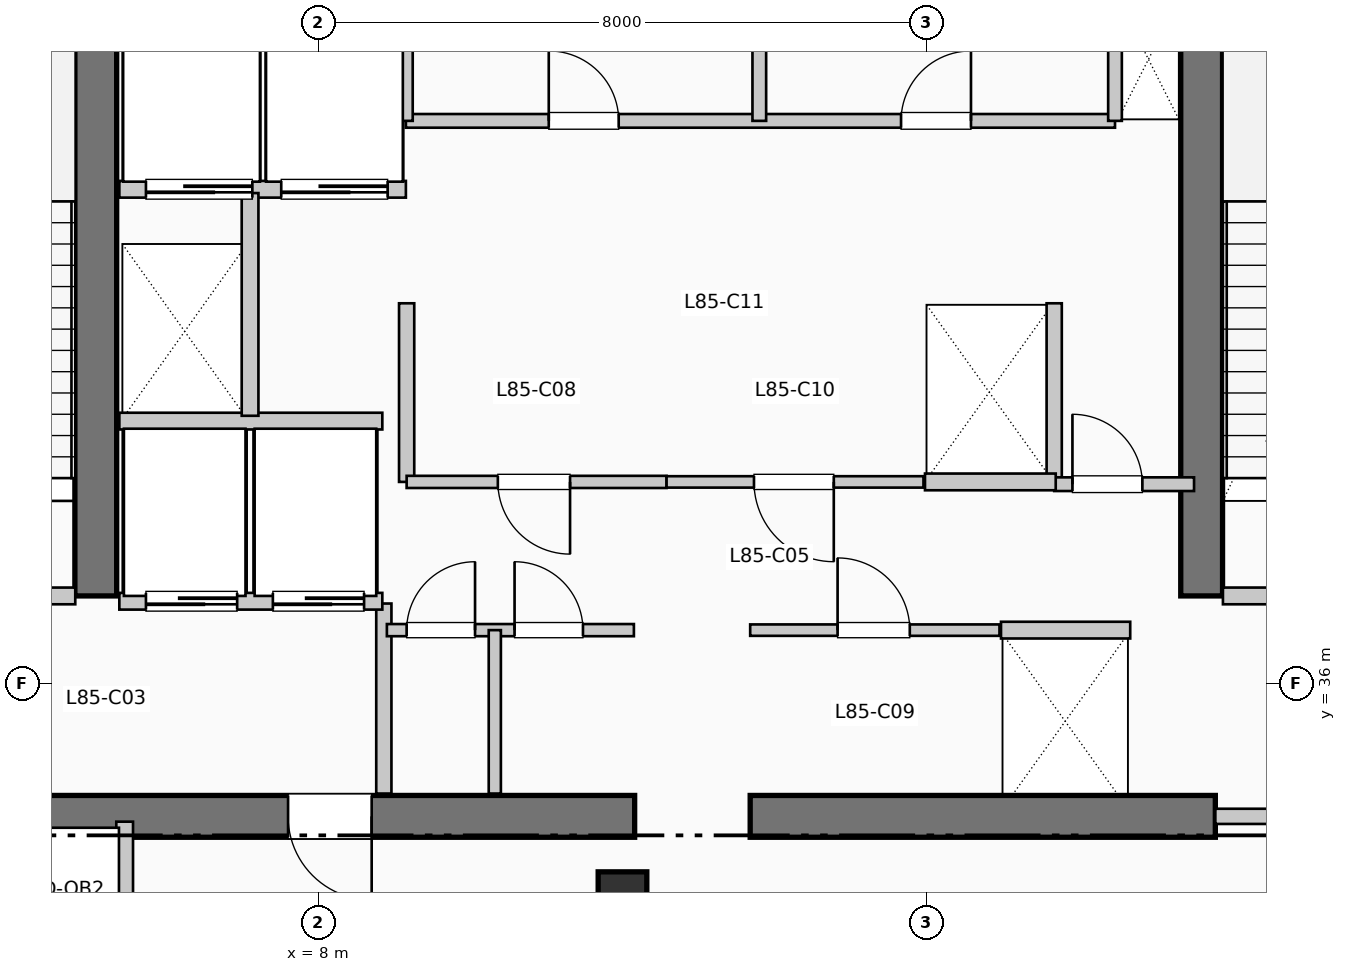
"""IFC4 building model, lengths in metres.
Left out: names, types, materials, properties, quantities, classifications, styles, units other than length and angle.
Written with IfcOpenShell. Run it as: python <this file> out.ifc"""

import sys

from ifc_helpers import new_model, si_unit, direction, frame, frame_2d, origin, origin_2d, place, context, subcontext, project, spatial, rectangle, extrude, element, fill, save


model = new_model("IFC4")
c1 = context("Model", 3, precision=1e-05, world=origin(), true_north=direction((0.0, 1.0)))
c2 = subcontext(c1, "Body", "Model", "MODEL_VIEW")
j1 = project(units=[si_unit("LENGTHUNIT", "METRE"), si_unit("PLANEANGLEUNIT", "RADIAN")], contexts=[c1])
p1 = place(None, origin())
s1 = spatial("IfcSite", under=j1, at=p1, CompositionType="ELEMENT")
p2 = place(p1, origin())
s2 = spatial("IfcBuilding", under=s1, at=p2, CompositionType="ELEMENT")
p3 = place(p2, frame((0.0, 0.0, 347.49)))
s3 = spatial("IfcBuildingStorey", under=s2, at=p3, CompositionType="ELEMENT", Elevation=347.49)
p4 = place(p3, frame((1.45, 34.25, 0.0), z_axis=(0.0, 0.0, 1.0), x_axis=(1.0, 0.0, 0.0)))
e1 = element("IfcWall", 1, at=p4, inside=s3, PredefinedType="SHEAR", context=c2, shape_type="SweptSolid", body=[
    extrude(rectangle(XDim=10.71, YDim=0.55, at=frame_2d((5.355, 0.0))), origin(), (0.0, 0.0, 1.0), 4.62),
])
p5 = place(p4, frame((7.25, 0.0, 0.0), z_axis=(0.0, 0.0, 1.0), x_axis=(-1.0, 0.0, 0.0)))
e2 = element("IfcOpeningElement", 2, at=p5, cuts=e1, PredefinedType="OPENING", context=c2, shape_type="SweptSolid", body=[
    extrude(rectangle(XDim=1.1, YDim=2.15, at=frame_2d((0.55, 1.075))), frame((0.0, 0.285, 0.0), z_axis=(0.0, -1.0, 0.0), x_axis=(1.0, 0.0, 0.0)), (0.0, 0.0, 1.0), 0.57),
])
p6 = place(p3, frame((13.68, 34.25, 0.0), z_axis=(0.0, 0.0, 1.0), x_axis=(1.0, 0.0, 0.0)))
e3 = element("IfcWall", 3, at=p6, inside=s3, PredefinedType="SHEAR", context=c2, shape_type="SweptSolid", body=[
    extrude(rectangle(XDim=6.12, YDim=0.55, at=frame_2d((3.06, 0.0))), origin(), (0.0, 0.0, 1.0), 4.62),
])
for number, where, z_axis, x_axis in (
    (4, (5.07, 37.15, 0.0), (0.0, 0.0, 1.0), (0.0, 1.0, 0.0)),
    (5, (19.62, 37.15, 0.0), (0.0, 0.0, 1.0), (0.0, 1.0, 0.0)),
):
    element("IfcWall", number, at=place(p3, frame(where, z_axis=z_axis, x_axis=x_axis)), inside=s3, PredefinedType="SHEAR", context=c2, shape_type="SweptSolid", body=[
        extrude(rectangle(XDim=7.89, YDim=0.55, at=frame_2d((3.945, 0.0))), origin(), (0.0, 0.0, 1.0), 4.62),
    ])
p7 = place(p3, frame((12.0, 33.2, 0.0), z_axis=(0.0, 0.0, 1.0), x_axis=(1.0, 0.0, 0.0)))
e6 = element("IfcColumn", 6, at=p7, inside=s3, PredefinedType="COLUMN", context=c2, shape_type="SweptSolid", body=[
    extrude(rectangle(XDim=0.64, YDim=0.64, at=origin_2d()), origin(), (0.0, 0.0, 1.0), 4.62),
])
p8 = place(p3, frame((1.65, 37.15, 0.0), z_axis=(0.0, 0.0, 1.0), x_axis=(1.0, 0.0, 0.0)))
e7 = element("IfcWall", 7, at=p8, inside=s3, PredefinedType="PARTITIONING", context=c2, shape_type="SweptSolid", body=[
    extrude(rectangle(XDim=3.15, YDim=0.22, at=frame_2d((1.575, 0.0))), origin(), (0.0, 0.0, 1.0), 4.37),
])
p9 = place(p8, frame((2.05, 0.0, 0.0), z_axis=(0.0, 0.0, 1.0), x_axis=(-1.0, 0.0, 0.0)))
e8 = element("IfcOpeningElement", 8, at=p9, cuts=e7, PredefinedType="OPENING", context=c2, shape_type="SweptSolid", body=[
    extrude(rectangle(XDim=1.05, YDim=2.15, at=frame_2d((0.525, 1.075))), frame((0.0, 0.12, 0.0), z_axis=(0.0, -1.0, 0.0), x_axis=(1.0, 0.0, 0.0)), (0.0, 0.0, 1.0), 0.24),
])
p10 = place(p3, frame((8.86, 34.55, 0.0), z_axis=(0.0, 0.0, 1.0), x_axis=(0.0, 1.0, 0.0)))
e9 = element("IfcWall", 9, at=p10, inside=s3, PredefinedType="PARTITIONING", context=c2, shape_type="SweptSolid", body=[
    extrude(rectangle(XDim=2.5, YDim=0.2, at=frame_2d((1.25, 0.0))), origin(), (0.0, 0.0, 1.0), 4.37),
])
p11 = place(p3, frame((19.9, 37.15, 0.0), z_axis=(0.0, 0.0, 1.0), x_axis=(1.0, 0.0, 0.0)))
e10 = element("IfcWall", 10, at=p11, inside=s3, PredefinedType="PARTITIONING", context=c2, shape_type="SweptSolid", body=[
    extrude(rectangle(XDim=3.15, YDim=0.22, at=frame_2d((1.575, 0.0))), origin(), (0.0, 0.0, 1.0), 4.37),
])
p12 = place(p11, frame((2.05, 0.0, 0.0), z_axis=(0.0, 0.0, 1.0), x_axis=(-1.0, 0.0, 0.0)))
e11 = element("IfcOpeningElement", 11, at=p12, cuts=e10, PredefinedType="OPENING", context=c2, shape_type="SweptSolid", body=[
    extrude(rectangle(XDim=1.05, YDim=2.15, at=frame_2d((0.525, 1.075))), frame((0.0, 0.12, 0.0), z_axis=(0.0, -1.0, 0.0), x_axis=(1.0, 0.0, 0.0)), (0.0, 0.0, 1.0), 0.24),
])
p13 = place(p3, frame((19.8, 34.25, 0.0), z_axis=(0.0, 0.0, 1.0), x_axis=(1.0, 0.0, 0.0)))
e12 = element("IfcWall", 12, at=p13, inside=s3, PredefinedType="PARTITIONING", context=c2, shape_type="SweptSolid", body=[
    extrude(rectangle(XDim=3.25, YDim=0.2, at=frame_2d((1.625, 0.0))), origin(), (0.0, 0.0, 1.0), 4.37),
])
p14 = place(p13, frame((2.15, 0.0, 0.0), z_axis=(0.0, 0.0, 1.0), x_axis=(-1.0, 0.0, 0.0)))
e13 = element("IfcOpeningElement", 13, at=p14, cuts=e12, PredefinedType="OPENING", context=c2, shape_type="SweptSolid", body=[
    extrude(rectangle(XDim=1.1, YDim=2.15, at=frame_2d((0.55, 1.075))), frame((0.0, 0.11, 0.0), z_axis=(0.0, -1.0, 0.0), x_axis=(1.0, 0.0, 0.0)), (0.0, 0.0, 1.0), 0.22),
])
p15 = place(p3, frame((5.38, 37.08, 0.0), z_axis=(0.0, 0.0, 1.0), x_axis=(1.0, 0.0, 0.0)))
e14 = element("IfcWall", 14, at=p15, inside=s3, PredefinedType="PARTITIONING", context=c2, shape_type="SweptSolid", body=[
    extrude(rectangle(XDim=3.46, YDim=0.22, at=frame_2d((1.73, 0.0))), origin(), (0.0, 0.0, 1.0), 4.37),
])
p16 = place(p15, frame((1.55, 0.0, 0.0), z_axis=(0.0, 0.0, 1.0), x_axis=(-1.0, 0.0, 0.0)))
e15 = element("IfcOpeningElement", 15, at=p16, cuts=e14, PredefinedType="OPENING", context=c2, shape_type="SweptSolid", body=[
    extrude(rectangle(XDim=1.2, YDim=2.2, at=frame_2d((0.6, 1.1))), frame((0.0, 0.12, 0.0), z_axis=(0.0, -1.0, 0.0), x_axis=(1.0, 0.0, 0.0)), (0.0, 0.0, 1.0), 0.24),
])
p17 = place(p15, frame((3.22, 0.0, 0.0), z_axis=(0.0, 0.0, 1.0), x_axis=(-1.0, 0.0, 0.0)))
e16 = element("IfcOpeningElement", 16, at=p17, cuts=e14, PredefinedType="OPENING", context=c2, shape_type="SweptSolid", body=[
    extrude(rectangle(XDim=1.2, YDim=2.2, at=frame_2d((0.6, 1.1))), frame((0.0, 0.12, 0.0), z_axis=(0.0, -1.0, 0.0), x_axis=(1.0, 0.0, 0.0)), (0.0, 0.0, 1.0), 0.24),
])
p18 = place(p3, frame((5.38, 39.45, 0.0), z_axis=(0.0, 0.0, 1.0), x_axis=(1.0, 0.0, 0.0)))
e17 = element("IfcWall", 17, at=p18, inside=s3, PredefinedType="PARTITIONING", context=c2, shape_type="SweptSolid", body=[
    extrude(rectangle(XDim=3.46, YDim=0.22, at=frame_2d((1.73, 0.0))), origin(), (0.0, 0.0, 1.0), 4.37),
])
p19 = place(p3, frame((5.38, 42.5, 0.0), z_axis=(0.0, 0.0, 1.0), x_axis=(1.0, 0.0, 0.0)))
e18 = element("IfcWall", 18, at=p19, inside=s3, PredefinedType="PARTITIONING", context=c2, shape_type="SweptSolid", body=[
    extrude(rectangle(XDim=3.77, YDim=0.22, at=frame_2d((1.885, 0.0))), origin(), (0.0, 0.0, 1.0), 4.37),
])
p20 = place(p19, frame((1.75, 0.0, 0.0), z_axis=(0.0, 0.0, 1.0), x_axis=(-1.0, 0.0, 0.0)))
e19 = element("IfcOpeningElement", 19, at=p20, cuts=e18, PredefinedType="OPENING", context=c2, shape_type="SweptSolid", body=[
    extrude(rectangle(XDim=1.4, YDim=2.2, at=frame_2d((0.7, 1.1))), frame((0.0, 0.12, 0.0), z_axis=(0.0, -1.0, 0.0), x_axis=(1.0, 0.0, 0.0)), (0.0, 0.0, 1.0), 0.24),
])
p21 = place(p19, frame((3.53, 0.0, 0.0), z_axis=(0.0, 0.0, 1.0), x_axis=(-1.0, 0.0, 0.0)))
e20 = element("IfcOpeningElement", 20, at=p21, cuts=e18, PredefinedType="OPENING", context=c2, shape_type="SweptSolid", body=[
    extrude(rectangle(XDim=1.4, YDim=2.2, at=frame_2d((0.7, 1.1))), frame((0.0, 0.12, 0.0), z_axis=(0.0, -1.0, 0.0), x_axis=(1.0, 0.0, 0.0)), (0.0, 0.0, 1.0), 0.24),
])
p22 = place(p3, frame((7.1, 39.52, 0.0), z_axis=(0.0, 0.0, 1.0), x_axis=(0.0, 1.0, 0.0)))
e21 = element("IfcWall", 21, at=p22, inside=s3, PredefinedType="PARTITIONING", context=c2, shape_type="SweptSolid", body=[
    extrude(rectangle(XDim=2.93, YDim=0.22, at=frame_2d((1.465, 0.0))), origin(), (0.0, 0.0, 1.0), 4.37),
])
p23 = place(p3, frame((5.45, 31.8, 0.0), z_axis=(0.0, 0.0, 1.0), x_axis=(0.0, 1.0, 0.0)))
e22 = element("IfcWall", 22, at=p23, inside=s3, PredefinedType="PARTITIONING", context=c2, shape_type="SweptSolid", body=[
    extrude(rectangle(XDim=2.38, YDim=0.22, at=frame_2d((1.19, 0.0))), origin(), (0.0, 0.0, 1.0), 4.37),
])
for number, where, z_axis, x_axis in (
    (23, (9.16, 38.65, 0.0), (0.0, 0.0, 1.0), (0.0, 1.0, 0.0)),
    (24, (17.68, 38.65, 0.0), (0.0, 0.0, 1.0), (0.0, 1.0, 0.0)),
):
    element("IfcWall", number, at=place(p3, frame(where, z_axis=z_axis, x_axis=x_axis)), inside=s3, PredefinedType="PARTITIONING", context=c2, shape_type="SweptSolid", body=[
        extrude(rectangle(XDim=2.35, YDim=0.2, at=frame_2d((1.175, 0.0))), origin(), (0.0, 0.0, 1.0), 4.37),
    ])
p24 = place(p3, frame((17.68, 38.62, 0.0), z_axis=(0.0, 0.0, 1.0), x_axis=(1.0, 0.0, 0.0)))
e25 = element("IfcWall", 25, at=p24, inside=s3, PredefinedType="PARTITIONING", context=c2, shape_type="SweptSolid", body=[
    extrude(rectangle(XDim=1.84, YDim=0.18, at=frame_2d((0.92, 0.0))), origin(), (0.0, 0.0, 1.0), 4.37),
])
p25 = place(p24, frame((0.24, 0.0, 0.0)))
e26 = element("IfcOpeningElement", 26, at=p25, cuts=e25, PredefinedType="OPENING", context=c2, shape_type="SweptSolid", body=[
    extrude(rectangle(XDim=0.92, YDim=2.1, at=frame_2d((0.46, 1.05))), frame((0.0, 0.1, 0.0), z_axis=(0.0, -1.0, 0.0), x_axis=(1.0, 0.0, 0.0)), (0.0, 0.0, 1.0), 0.2),
])
p26 = place(p3, frame((8.9, 36.7, 0.0), z_axis=(0.0, 0.0, 1.0), x_axis=(1.0, 0.0, 0.0)))
e27 = element("IfcWall", 27, at=p26, inside=s3, PredefinedType="PARTITIONING", context=c2, shape_type="SweptSolid", body=[
    extrude(rectangle(XDim=3.25, YDim=0.16, at=frame_2d((1.625, 0.0))), origin(), (0.0, 0.0, 1.0), 4.37),
])
p27 = place(p26, frame((0.26, 0.0, 0.0)))
e28 = element("IfcOpeningElement", 28, at=p27, cuts=e27, PredefinedType="OPENING", context=c2, shape_type="SweptSolid", body=[
    extrude(rectangle(XDim=0.9, YDim=2.15, at=frame_2d((0.45, 1.075))), frame((0.0, 0.09, 0.0), z_axis=(0.0, -1.0, 0.0), x_axis=(1.0, 0.0, 0.0)), (0.0, 0.0, 1.0), 0.18),
])
p28 = place(p26, frame((1.68, 0.0, 0.0)))
e29 = element("IfcOpeningElement", 29, at=p28, cuts=e27, PredefinedType="OPENING", context=c2, shape_type="SweptSolid", body=[
    extrude(rectangle(XDim=0.9, YDim=2.15, at=frame_2d((0.45, 1.075))), frame((0.0, 0.09, 0.0), z_axis=(0.0, -1.0, 0.0), x_axis=(1.0, 0.0, 0.0)), (0.0, 0.0, 1.0), 0.18),
])
p29 = place(p3, frame((10.32, 34.55, 0.0), z_axis=(0.0, 0.0, 1.0), x_axis=(0.0, 1.0, 0.0)))
e30 = element("IfcWall", 30, at=p29, inside=s3, PredefinedType="PARTITIONING", context=c2, shape_type="SweptSolid", body=[
    extrude(rectangle(XDim=2.15, YDim=0.16, at=frame_2d((1.075, 0.0))), origin(), (0.0, 0.0, 1.0), 4.37),
])
p30 = place(p3, frame((9.16, 38.65, 0.0), z_axis=(0.0, 0.0, 1.0), x_axis=(1.0, 0.0, 0.0)))
e31 = element("IfcWall", 31, at=p30, inside=s3, PredefinedType="PARTITIONING", context=c2, shape_type="SweptSolid", body=[
    extrude(rectangle(XDim=3.42, YDim=0.16, at=frame_2d((1.71, 0.0))), origin(), (0.0, 0.0, 1.0), 4.37),
])
p31 = place(p30, frame((2.15, 0.0, 0.0), z_axis=(0.0, 0.0, 1.0), x_axis=(-1.0, 0.0, 0.0)))
e32 = element("IfcOpeningElement", 32, at=p31, cuts=e31, PredefinedType="OPENING", context=c2, shape_type="SweptSolid", body=[
    extrude(rectangle(XDim=0.95, YDim=2.15, at=frame_2d((0.475, 1.075))), frame((0.0, 0.09, 0.0), z_axis=(0.0, -1.0, 0.0), x_axis=(1.0, 0.0, 0.0)), (0.0, 0.0, 1.0), 0.18),
])
p32 = place(p3, frame((13.68, 36.7, 0.0), z_axis=(0.0, 0.0, 1.0), x_axis=(1.0, 0.0, 0.0)))
e33 = element("IfcWall", 33, at=p32, inside=s3, PredefinedType="PARTITIONING", context=c2, shape_type="SweptSolid", body=[
    extrude(rectangle(XDim=3.28, YDim=0.15, at=frame_2d((1.64, 0.0))), origin(), (0.0, 0.0, 1.0), 4.37),
])
p33 = place(p32, frame((1.15, 0.0, 0.0)))
e34 = element("IfcOpeningElement", 34, at=p33, cuts=e33, PredefinedType="OPENING", context=c2, shape_type="SweptSolid", body=[
    extrude(rectangle(XDim=0.95, YDim=2.15, at=frame_2d((0.475, 1.075))), frame((0.0, 0.085, 0.0), z_axis=(0.0, -1.0, 0.0), x_axis=(1.0, 0.0, 0.0)), (0.0, 0.0, 1.0), 0.17),
])
p34 = place(p3, frame((12.58, 38.65, 0.0), z_axis=(0.0, 0.0, 1.0), x_axis=(1.0, 0.0, 0.0)))
e35 = element("IfcWall", 35, at=p34, inside=s3, PredefinedType="PARTITIONING", context=c2, shape_type="SweptSolid", body=[
    extrude(rectangle(XDim=3.38, YDim=0.15, at=frame_2d((1.69, 0.0))), origin(), (0.0, 0.0, 1.0), 4.37),
])
p35 = place(p34, frame((2.2, 0.0, 0.0), z_axis=(0.0, 0.0, 1.0), x_axis=(-1.0, 0.0, 0.0)))
e36 = element("IfcOpeningElement", 36, at=p35, cuts=e35, PredefinedType="OPENING", context=c2, shape_type="SweptSolid", body=[
    extrude(rectangle(XDim=1.05, YDim=2.15, at=frame_2d((0.525, 1.075))), frame((0.0, 0.085, 0.0), z_axis=(0.0, -1.0, 0.0), x_axis=(1.0, 0.0, 0.0)), (0.0, 0.0, 1.0), 0.17),
])
p36 = place(p3, frame((16.98, 36.7, 0.0), z_axis=(0.0, 0.0, 1.0), x_axis=(1.0, 0.0, 0.0)))
e37 = element("IfcWall", 37, at=p36, inside=s3, PredefinedType="PARTITIONING", context=c2, shape_type="SweptSolid", body=[
    extrude(rectangle(XDim=1.7, YDim=0.22, at=frame_2d((0.85, 0.0))), origin(), (0.0, 0.0, 1.0), 4.37),
])
p37 = place(p3, frame((15.98, 38.65, 0.0), z_axis=(0.0, 0.0, 1.0), x_axis=(1.0, 0.0, 0.0)))
e38 = element("IfcWall", 38, at=p37, inside=s3, PredefinedType="PARTITIONING", context=c2, shape_type="SweptSolid", body=[
    extrude(rectangle(XDim=1.72, YDim=0.22, at=frame_2d((0.86, 0.0))), origin(), (0.0, 0.0, 1.0), 4.37),
])
p38 = place(p3, frame((9.15, 43.4, 0.0), z_axis=(0.0, 0.0, 1.0), x_axis=(1.0, 0.0, 0.0)))
e39 = element("IfcWall", 39, at=p38, inside=s3, PredefinedType="PLUMBINGWALL", context=c2, shape_type="SweptSolid", body=[
    extrude(rectangle(XDim=9.33, YDim=0.18, at=frame_2d((4.665, 0.0))), origin(), (0.0, 0.0, 1.0), 4.37),
])
p39 = place(p38, frame((1.88, 0.0, 0.0)))
e40 = element("IfcOpeningElement", 40, at=p39, cuts=e39, PredefinedType="OPENING", context=c2, shape_type="SweptSolid", body=[
    extrude(rectangle(XDim=0.92, YDim=2.1, at=frame_2d((0.46, 1.05))), frame((0.0, 0.1, 0.0), z_axis=(0.0, -1.0, 0.0), x_axis=(1.0, 0.0, 0.0)), (0.0, 0.0, 1.0), 0.2),
])
p40 = place(p38, frame((6.515, 0.0, 0.0)))
e41 = element("IfcOpeningElement", 41, at=p40, cuts=e39, PredefinedType="OPENING", context=c2, shape_type="SweptSolid", body=[
    extrude(rectangle(XDim=0.92, YDim=2.1, at=frame_2d((0.46, 1.05))), frame((0.0, 0.1, 0.0), z_axis=(0.0, -1.0, 0.0), x_axis=(1.0, 0.0, 0.0)), (0.0, 0.0, 1.0), 0.2),
])
for number, where, z_axis, x_axis in (
    (42, (9.15, 43.4, 0.0), (0.0, 0.0, 1.0), (0.0, 1.0, 0.0)),
    (43, (18.48, 43.4, 0.0), (0.0, 0.0, 1.0), (0.0, 1.0, 0.0)),
    (44, (13.8, 43.4, 0.0), (0.0, 0.0, 1.0), (0.0, 1.0, 0.0)),
):
    element("IfcWall", number, at=place(p3, frame(where, z_axis=z_axis, x_axis=x_axis)), inside=s3, PredefinedType="PLUMBINGWALL", context=c2, shape_type="SweptSolid", body=[
        extrude(rectangle(XDim=1.88, YDim=0.18, at=frame_2d((0.94, 0.0))), origin(), (0.0, 0.0, 1.0), 4.37),
    ])
p41 = place(p5, origin())
e45 = element("IfcDoor", 45, at=p41, inside=s3, OperationType="SINGLE_SWING_RIGHT", PredefinedType="DOOR", context=c2, shape_type="SweptSolid", body=[
    extrude(rectangle(XDim=1.1, YDim=2.15, at=frame_2d((0.55, 1.075))), frame((0.0, 0.025, 0.0), z_axis=(0.0, -1.0, 0.0), x_axis=(1.0, 0.0, 0.0)), (0.0, 0.0, 1.0), 0.05),
])
fill(e2, e45)
p42 = place(p16, origin())
e46 = element("IfcDoor", 46, at=p42, inside=s3, OperationType="SLIDING_TO_RIGHT", PredefinedType="DOOR", context=c2, shape_type="SweptSolid", body=[
    extrude(rectangle(XDim=1.2, YDim=2.2, at=frame_2d((0.6, 1.1))), frame((0.0, 0.025, 0.0), z_axis=(0.0, -1.0, 0.0), x_axis=(1.0, 0.0, 0.0)), (0.0, 0.0, 1.0), 0.05),
])
fill(e15, e46)
p43 = place(p17, origin())
e47 = element("IfcDoor", 47, at=p43, inside=s3, OperationType="SLIDING_TO_RIGHT", PredefinedType="DOOR", context=c2, shape_type="SweptSolid", body=[
    extrude(rectangle(XDim=1.2, YDim=2.2, at=frame_2d((0.6, 1.1))), frame((0.0, 0.025, 0.0), z_axis=(0.0, -1.0, 0.0), x_axis=(1.0, 0.0, 0.0)), (0.0, 0.0, 1.0), 0.05),
])
fill(e16, e47)
p44 = place(p20, origin())
e48 = element("IfcDoor", 48, at=p44, inside=s3, OperationType="SLIDING_TO_LEFT", PredefinedType="DOOR", context=c2, shape_type="SweptSolid", body=[
    extrude(rectangle(XDim=1.4, YDim=2.2, at=frame_2d((0.7, 1.1))), frame((0.0, 0.025, 0.0), z_axis=(0.0, -1.0, 0.0), x_axis=(1.0, 0.0, 0.0)), (0.0, 0.0, 1.0), 0.05),
])
fill(e19, e48)
p45 = place(p21, origin())
e49 = element("IfcDoor", 49, at=p45, inside=s3, OperationType="SLIDING_TO_LEFT", PredefinedType="DOOR", context=c2, shape_type="SweptSolid", body=[
    extrude(rectangle(XDim=1.4, YDim=2.2, at=frame_2d((0.7, 1.1))), frame((0.0, 0.025, 0.0), z_axis=(0.0, -1.0, 0.0), x_axis=(1.0, 0.0, 0.0)), (0.0, 0.0, 1.0), 0.05),
])
fill(e20, e49)
p46 = place(p25, origin())
e50 = element("IfcDoor", 50, at=p46, inside=s3, OperationType="SINGLE_SWING_LEFT", PredefinedType="DOOR", context=c2, shape_type="SweptSolid", body=[
    extrude(rectangle(XDim=0.92, YDim=2.1, at=frame_2d((0.46, 1.05))), frame((0.0, 0.025, 0.0), z_axis=(0.0, -1.0, 0.0), x_axis=(1.0, 0.0, 0.0)), (0.0, 0.0, 1.0), 0.05),
])
fill(e26, e50)
p47 = place(p27, origin())
e51 = element("IfcDoor", 51, at=p47, inside=s3, OperationType="SINGLE_SWING_RIGHT", PredefinedType="DOOR", context=c2, shape_type="SweptSolid", body=[
    extrude(rectangle(XDim=0.9, YDim=2.15, at=frame_2d((0.45, 1.075))), frame((0.0, 0.025, 0.0), z_axis=(0.0, -1.0, 0.0), x_axis=(1.0, 0.0, 0.0)), (0.0, 0.0, 1.0), 0.05),
])
fill(e28, e51)
p48 = place(p28, origin())
e52 = element("IfcDoor", 52, at=p48, inside=s3, OperationType="SINGLE_SWING_LEFT", PredefinedType="DOOR", context=c2, shape_type="SweptSolid", body=[
    extrude(rectangle(XDim=0.9, YDim=2.15, at=frame_2d((0.45, 1.075))), frame((0.0, 0.025, 0.0), z_axis=(0.0, -1.0, 0.0), x_axis=(1.0, 0.0, 0.0)), (0.0, 0.0, 1.0), 0.05),
])
fill(e29, e52)
p49 = place(p31, origin())
e53 = element("IfcDoor", 53, at=p49, inside=s3, OperationType="SINGLE_SWING_RIGHT", PredefinedType="DOOR", context=c2, shape_type="SweptSolid", body=[
    extrude(rectangle(XDim=0.95, YDim=2.15, at=frame_2d((0.475, 1.075))), frame((0.0, 0.025, 0.0), z_axis=(0.0, -1.0, 0.0), x_axis=(1.0, 0.0, 0.0)), (0.0, 0.0, 1.0), 0.05),
])
fill(e32, e53)
p50 = place(p33, origin())
e54 = element("IfcDoor", 54, at=p50, inside=s3, OperationType="SINGLE_SWING_LEFT", PredefinedType="DOOR", context=c2, shape_type="SweptSolid", body=[
    extrude(rectangle(XDim=0.95, YDim=2.15, at=frame_2d((0.475, 1.075))), frame((0.0, 0.025, 0.0), z_axis=(0.0, -1.0, 0.0), x_axis=(1.0, 0.0, 0.0)), (0.0, 0.0, 1.0), 0.05),
])
fill(e34, e54)
p51 = place(p35, origin())
e55 = element("IfcDoor", 55, at=p51, inside=s3, OperationType="SINGLE_SWING_RIGHT", PredefinedType="DOOR", context=c2, shape_type="SweptSolid", body=[
    extrude(rectangle(XDim=1.05, YDim=2.15, at=frame_2d((0.525, 1.075))), frame((0.0, 0.025, 0.0), z_axis=(0.0, -1.0, 0.0), x_axis=(1.0, 0.0, 0.0)), (0.0, 0.0, 1.0), 0.05),
])
fill(e36, e55)
p52 = place(p39, origin())
e56 = element("IfcDoor", 56, at=p52, inside=s3, OperationType="SINGLE_SWING_LEFT", PredefinedType="DOOR", context=c2, shape_type="SweptSolid", body=[
    extrude(rectangle(XDim=0.92, YDim=2.1, at=frame_2d((0.46, 1.05))), frame((0.0, 0.025, 0.0), z_axis=(0.0, -1.0, 0.0), x_axis=(1.0, 0.0, 0.0)), (0.0, 0.0, 1.0), 0.05),
])
fill(e40, e56)
p53 = place(p40, origin())
e57 = element("IfcDoor", 57, at=p53, inside=s3, OperationType="SINGLE_SWING_RIGHT", PredefinedType="DOOR", context=c2, shape_type="SweptSolid", body=[
    extrude(rectangle(XDim=0.92, YDim=2.1, at=frame_2d((0.46, 1.05))), frame((0.0, 0.025, 0.0), z_axis=(0.0, -1.0, 0.0), x_axis=(1.0, 0.0, 0.0)), (0.0, 0.0, 1.0), 0.05),
])
fill(e41, e57)
save(model, sys.argv[1])
